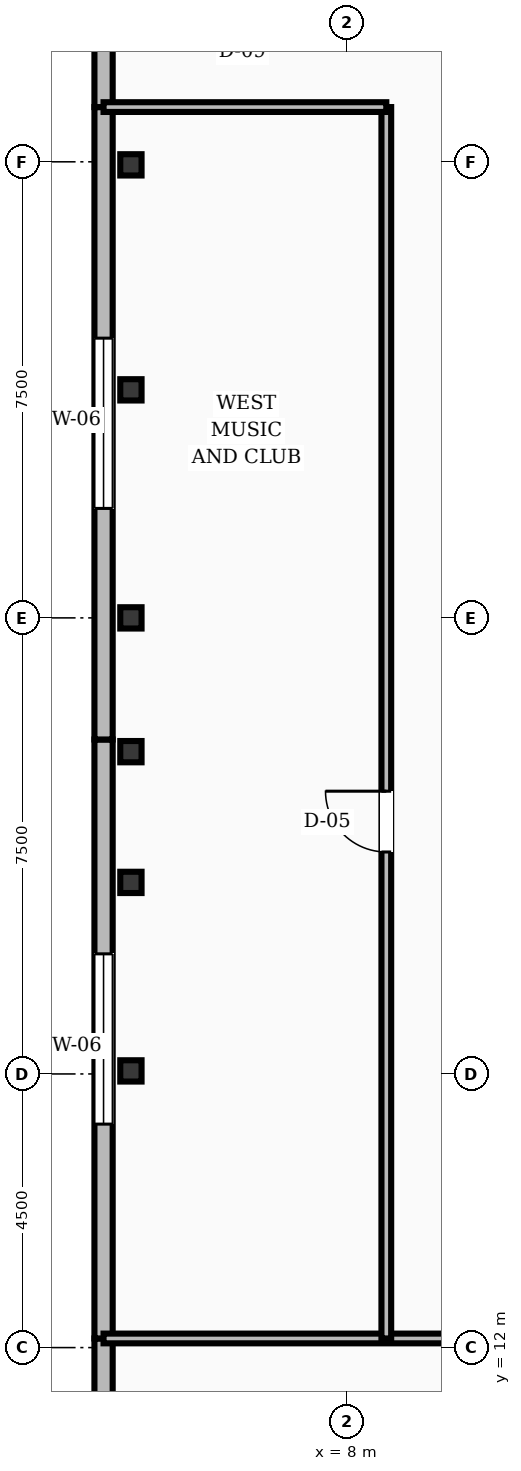
"""IFC4 building model, lengths in metres.
Left out: names, types, materials, properties, quantities, classifications, styles, units other than length and angle.
Written with IfcOpenShell. Run it as: python <this file> out.ifc"""

import sys

from ifc_helpers import new_model, si_unit, direction, frame, frame_2d, origin, origin_2d, place, context, subcontext, project, spatial, rectangle, hollow_rectangle, i_section, extrude, element, fill, save


model = new_model("IFC4")
c1 = context("Model", 3, precision=1e-05, world=origin(), true_north=direction((0.0, 1.0)))
c2 = subcontext(c1, "Body", "Model", "MODEL_VIEW")
j1 = project(units=[si_unit("LENGTHUNIT", "METRE"), si_unit("PLANEANGLEUNIT", "RADIAN")], contexts=[c1])
p1 = place(None, origin())
s1 = spatial("IfcSite", under=j1, at=p1, CompositionType="ELEMENT")
p2 = place(p1, origin())
s2 = spatial("IfcBuilding", under=s1, at=p2, CompositionType="ELEMENT")
p3 = place(p2, frame((0.0, 0.0, 10.0)))
s3 = spatial("IfcBuildingStorey", under=s2, at=p3, CompositionType="ELEMENT", Elevation=10.0)
for number, where, z_axis, x_axis in (
    (1, (4.45, 16.55, 0.0), (0.0, 0.0, 1.0), (1.0, 0.0, 0.0)),
    (2, (4.45, 19.65, 0.0), (0.0, 0.0, 1.0), (1.0, 0.0, 0.0)),
    (3, (4.45, 24.0, 0.0), (0.0, 0.0, 1.0), (1.0, 0.0, 0.0)),
    (4, (4.45, 27.75, 0.0), (0.0, 0.0, 1.0), (1.0, 0.0, 0.0)),
    (5, (4.45, 31.45, 0.0), (0.0, 0.0, 1.0), (1.0, 0.0, 0.0)),
):
    element("IfcColumn", number, at=place(p3, frame(where, z_axis=z_axis, x_axis=x_axis)), inside=s3, PredefinedType="COLUMN", context=c2, shape_type="SweptSolid", body=[
        extrude(i_section(OverallWidth=0.35, OverallDepth=0.35, WebThickness=0.012, FlangeThickness=0.019, FilletRadius=0.016, at=origin_2d()), origin(), (0.0, 0.0, 1.0), 4.8),
    ])
p4 = place(p3, frame((4.45, 21.8, 0.0), z_axis=(0.0, 0.0, 1.0), x_axis=(1.0, 0.0, 0.0)))
e6 = element("IfcColumn", 6, at=p4, inside=s3, PredefinedType="PILASTER", context=c2, shape_type="SweptSolid", body=[
    extrude(hollow_rectangle(XDim=0.35, YDim=0.35, WallThickness=0.016, at=origin_2d()), origin(), (0.0, 0.0, 1.0), 4.8),
])
p5 = place(p3, frame((4.0, 12.15, 0.0), z_axis=(0.0, 0.0, 1.0), x_axis=(0.0, -1.0, 0.0)))
e7 = element("IfcWall", 7, at=p5, inside=s3, PredefinedType="STANDARD", context=c2, shape_type="SweptSolid", body=[
    extrude(rectangle(XDim=9.15, YDim=0.3, at=frame_2d((4.575, 0.0))), origin(), (0.0, 0.0, 1.0), 3.57),
])
p6 = place(p5, frame((3.175, 0.0, 0.85)))
e8 = element("IfcOpeningElement", 8, at=p6, cuts=e7, PredefinedType="OPENING", context=c2, shape_type="SweptSolid", body=[
    extrude(rectangle(XDim=2.8, YDim=2.3, at=frame_2d((1.4, 1.15))), frame((0.0, 0.16, 0.0), z_axis=(0.0, -1.0, 0.0), x_axis=(1.0, 0.0, 0.0)), (0.0, 0.0, 1.0), 0.32),
])
p7 = place(p3, frame((4.0, 22.0, 0.0), z_axis=(0.0, 0.0, 1.0), x_axis=(0.0, -1.0, 0.0)))
e9 = element("IfcWall", 9, at=p7, inside=s3, PredefinedType="STANDARD", context=c2, shape_type="SweptSolid", body=[
    extrude(rectangle(XDim=9.85, YDim=0.3, at=frame_2d((4.925, 0.0))), origin(), (0.0, 0.0, 1.0), 3.57),
])
p8 = place(p7, frame((3.525, 0.0, 0.85)))
e10 = element("IfcOpeningElement", 10, at=p8, cuts=e9, PredefinedType="OPENING", context=c2, shape_type="SweptSolid", body=[
    extrude(rectangle(XDim=2.8, YDim=2.3, at=frame_2d((1.4, 1.15))), frame((0.0, 0.16, 0.0), z_axis=(0.0, -1.0, 0.0), x_axis=(1.0, 0.0, 0.0)), (0.0, 0.0, 1.0), 0.32),
])
p9 = place(p3, frame((4.0, 32.4, 0.0), z_axis=(0.0, 0.0, 1.0), x_axis=(0.0, -1.0, 0.0)))
e11 = element("IfcWall", 11, at=p9, inside=s3, PredefinedType="STANDARD", context=c2, shape_type="SweptSolid", body=[
    extrude(rectangle(XDim=10.4, YDim=0.3, at=frame_2d((5.2, 0.0))), origin(), (0.0, 0.0, 1.0), 3.57),
])
p10 = place(p9, frame((3.8, 0.0, 0.85)))
e12 = element("IfcOpeningElement", 12, at=p10, cuts=e11, PredefinedType="OPENING", context=c2, shape_type="SweptSolid", body=[
    extrude(rectangle(XDim=2.8, YDim=2.3, at=frame_2d((1.4, 1.15))), frame((0.0, 0.16, 0.0), z_axis=(0.0, -1.0, 0.0), x_axis=(1.0, 0.0, 0.0)), (0.0, 0.0, 1.0), 0.32),
])
p11 = place(p3, frame((4.0, 34.28, 0.0), z_axis=(0.0, 0.0, 1.0), x_axis=(0.0, -1.0, 0.0)))
e13 = element("IfcWall", 13, at=p11, inside=s3, PredefinedType="STANDARD", context=c2, shape_type="SweptSolid", body=[
    extrude(rectangle(XDim=1.88, YDim=0.3, at=frame_2d((0.94, 0.0))), origin(), (0.0, 0.0, 1.0), 3.57),
])
p12 = place(p3, frame((4.0, 12.15, 0.0), z_axis=(0.0, 0.0, 1.0), x_axis=(1.0, 0.0, 0.0)))
e14 = element("IfcWall", 14, at=p12, inside=s3, PredefinedType="SOLIDWALL", context=c2, shape_type="SweptSolid", body=[
    extrude(rectangle(XDim=51.35, YDim=0.16, at=frame_2d((25.675, 0.0))), origin(), (0.0, 0.0, 1.0), 3.52),
])
p13 = place(p12, frame((14.0, 0.0, 0.0)))
e15 = element("IfcOpeningElement", 15, at=p13, cuts=e14, PredefinedType="OPENING", context=c2, shape_type="SweptSolid", body=[
    extrude(rectangle(XDim=1.4, YDim=2.15, at=frame_2d((0.7, 1.075))), frame((0.0, 0.09, 0.0), z_axis=(0.0, -1.0, 0.0), x_axis=(1.0, 0.0, 0.0)), (0.0, 0.0, 1.0), 0.18),
])
p14 = place(p12, frame((40.0, 0.0, 0.0)))
e16 = element("IfcOpeningElement", 16, at=p14, cuts=e14, PredefinedType="OPENING", context=c2, shape_type="SweptSolid", body=[
    extrude(rectangle(XDim=1.2, YDim=2.1, at=frame_2d((0.6, 1.05))), frame((0.0, 0.09, 0.0), z_axis=(0.0, -1.0, 0.0), x_axis=(1.0, 0.0, 0.0)), (0.0, 0.0, 1.0), 0.18),
])
p15 = place(p3, frame((8.65, 12.15, 0.0), z_axis=(0.0, 0.0, 1.0), x_axis=(0.0, 1.0, 0.0)))
e17 = element("IfcWall", 17, at=p15, inside=s3, PredefinedType="SOLIDWALL", context=c2, shape_type="SweptSolid", body=[
    extrude(rectangle(XDim=20.25, YDim=0.16, at=frame_2d((10.125, 0.0))), origin(), (0.0, 0.0, 1.0), 3.52),
])
p16 = place(p15, frame((8.0, 0.0, 0.0)))
e18 = element("IfcOpeningElement", 18, at=p16, cuts=e17, PredefinedType="OPENING", context=c2, shape_type="SweptSolid", body=[
    extrude(rectangle(XDim=1.0, YDim=2.1, at=frame_2d((0.5, 1.05))), frame((0.0, 0.09, 0.0), z_axis=(0.0, -1.0, 0.0), x_axis=(1.0, 0.0, 0.0)), (0.0, 0.0, 1.0), 0.18),
])
p17 = place(p3, frame((4.0, 32.4, 0.0), z_axis=(0.0, 0.0, 1.0), x_axis=(1.0, 0.0, 0.0)))
e19 = element("IfcWall", 19, at=p17, inside=s3, PredefinedType="SOLIDWALL", context=c2, shape_type="SweptSolid", body=[
    extrude(rectangle(XDim=4.65, YDim=0.16, at=frame_2d((2.325, 0.0))), origin(), (0.0, 0.0, 1.0), 3.52),
])
p18 = place(p8, origin())
e20 = element("IfcWindow", 20, at=p18, inside=s3, PartitioningType="SINGLE_PANEL", PredefinedType="WINDOW", context=c2, shape_type="SweptSolid", body=[
    extrude(rectangle(XDim=2.8, YDim=2.3, at=frame_2d((1.4, 1.15))), frame((0.0, 0.03, 0.0), z_axis=(0.0, -1.0, 0.0), x_axis=(1.0, 0.0, 0.0)), (0.0, 0.0, 1.0), 0.06),
])
fill(e10, e20)
p19 = place(p10, origin())
e21 = element("IfcWindow", 21, at=p19, inside=s3, PartitioningType="SINGLE_PANEL", PredefinedType="WINDOW", context=c2, shape_type="SweptSolid", body=[
    extrude(rectangle(XDim=2.8, YDim=2.3, at=frame_2d((1.4, 1.15))), frame((0.0, 0.03, 0.0), z_axis=(0.0, -1.0, 0.0), x_axis=(1.0, 0.0, 0.0)), (0.0, 0.0, 1.0), 0.06),
])
fill(e12, e21)
p20 = place(p16, origin())
e22 = element("IfcDoor", 22, at=p20, inside=s3, OperationType="SINGLE_SWING_RIGHT", PredefinedType="DOOR", context=c2, shape_type="SweptSolid", body=[
    extrude(rectangle(XDim=1.0, YDim=2.1, at=frame_2d((0.5, 1.05))), frame((0.0, 0.025, 0.0), z_axis=(0.0, -1.0, 0.0), x_axis=(1.0, 0.0, 0.0)), (0.0, 0.0, 1.0), 0.05),
])
fill(e18, e22)
save(model, sys.argv[1])
